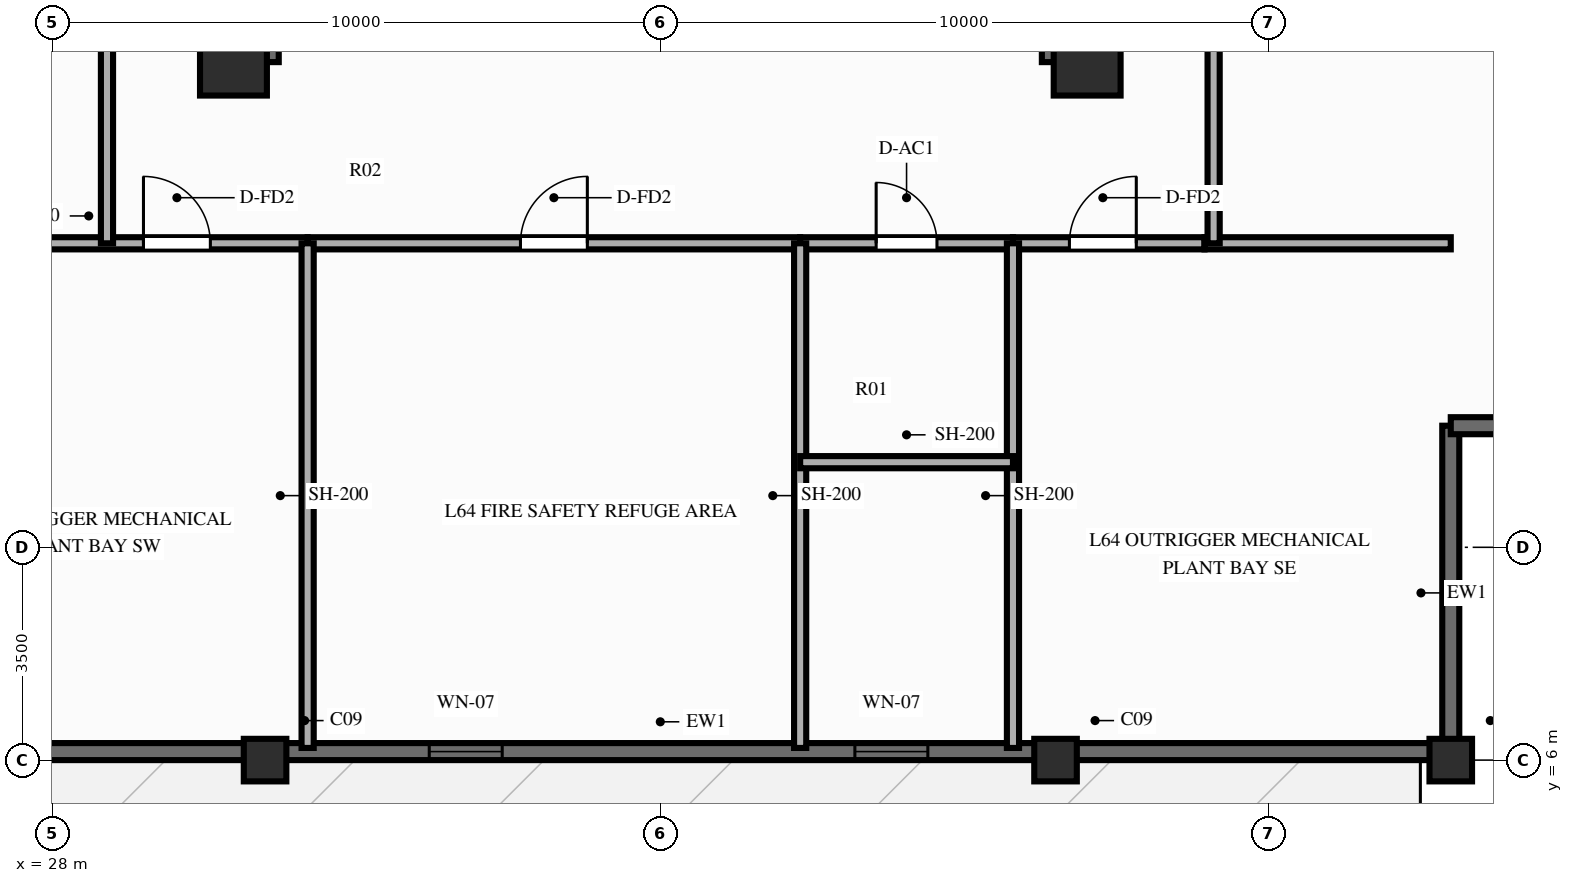
"""IFC4 building model, lengths in metres.
Left out: names, types, materials, properties, quantities, classifications, styles, units other than length and angle.
Written with IfcOpenShell. Run it as: python <this file> out.ifc"""

import sys

from ifc_helpers import new_model, si_unit, direction, frame, frame_2d, origin, origin_2d, place, context, subcontext, project, spatial, rectangle, extrude, source, transform, mapped, element, fill, save


model = new_model("IFC4")
c1 = context("Model", 3, precision=1e-05, world=origin(), true_north=direction((0.0, 1.0)))
c2 = subcontext(c1, "Body", "Model", "MODEL_VIEW")
j1 = project(units=[si_unit("LENGTHUNIT", "METRE"), si_unit("PLANEANGLEUNIT", "RADIAN")], contexts=[c1])
p1 = place(None, origin())
s1 = spatial("IfcSite", under=j1, at=p1, CompositionType="ELEMENT")
p2 = place(p1, origin())
s2 = spatial("IfcBuilding", under=s1, at=p2, CompositionType="ELEMENT")
p3 = place(p2, frame((0.0, 0.0, 206.5)))
s3 = spatial("IfcBuildingStorey", under=s2, at=p3, CompositionType="ELEMENT", Elevation=206.5)
p4 = place(p3, frame((31.5, 17.48, 0.0), z_axis=(0.0, 0.0, 1.0), x_axis=(0.0, 1.0, 0.0)))
e1 = element("IfcWall", 1, at=p4, inside=s3, PredefinedType="SHEAR", context=c2, shape_type="SweptSolid", body=[
    extrude(rectangle(XDim=19.04, YDim=0.45, at=frame_2d((9.52, 0.0))), origin(), (0.0, 0.0, 1.0), 3.8),
])
p5 = place(p4, frame((6.32, 0.0, 0.0)))
e2 = element("IfcOpeningElement", 2, at=p5, cuts=e1, PredefinedType="OPENING", context=c2, shape_type="SweptSolid", body=[
    extrude(rectangle(XDim=1.1, YDim=2.15, at=frame_2d((0.55, 1.075))), frame((0.0, 0.237, 0.0), z_axis=(0.0, -1.0, 0.0), x_axis=(1.0, 0.0, 0.0)), (0.0, 0.0, 1.0), 0.474),
])
p6 = place(p3, frame((44.5, 17.48, 0.0), z_axis=(0.0, 0.0, 1.0), x_axis=(0.0, 1.0, 0.0)))
e3 = element("IfcWall", 3, at=p6, inside=s3, PredefinedType="SHEAR", context=c2, shape_type="SweptSolid", body=[
    extrude(rectangle(XDim=19.04, YDim=0.45, at=frame_2d((9.52, 0.0))), origin(), (0.0, 0.0, 1.0), 3.8),
])
p7 = place(p6, frame((12.67, 0.0, 0.0), z_axis=(0.0, 0.0, 1.0), x_axis=(-1.0, 0.0, 0.0)))
e4 = element("IfcOpeningElement", 4, at=p7, cuts=e3, PredefinedType="OPENING", context=c2, shape_type="SweptSolid", body=[
    extrude(rectangle(XDim=1.1, YDim=2.15, at=frame_2d((0.55, 1.075))), frame((0.0, 0.237, 0.0), z_axis=(0.0, -1.0, 0.0), x_axis=(1.0, 0.0, 0.0)), (0.0, 0.0, 1.0), 0.474),
])
m1 = source(origin(), c2, "Body", "SweptSolid", [
    extrude(rectangle(XDim=1.1, YDim=1.1, at=origin_2d()), origin(), (0.0, 0.0, 1.0), 3.8),
])
for number, where, z_axis, x_axis in (
    (5, (30.98, 17.48, 0.0), (0.0, 0.0, 1.0), (1.0, 0.0, 0.0)),
    (6, (45.02, 17.48, 0.0), (0.0, 0.0, 1.0), (1.0, 0.0, 0.0)),
):
    element("IfcColumn", number, at=place(p3, frame(where, z_axis=z_axis, x_axis=x_axis)), inside=s3, PredefinedType="COLUMN", context=c2, shape_type="MappedRepresentation", body=[
        mapped(m1, transform((0.0, 0.0, 0.0), scale=1.0)),
    ])
m2 = source(origin(), c2, "Body", "SweptSolid", [
    extrude(rectangle(XDim=0.7, YDim=0.7, at=origin_2d()), origin(), (0.0, 0.0, 1.0), 3.8),
])
for number, where, z_axis, x_axis in (
    (7, (31.5, 6.0, 0.0), (0.0, 0.0, 1.0), (1.0, 0.0, 0.0)),
    (8, (44.5, 6.0, 0.0), (0.0, 0.0, 1.0), (1.0, 0.0, 0.0)),
    (9, (51.0, 6.0, 0.0), (0.0, 0.0, 1.0), (1.0, 0.0, 0.0)),
):
    element("IfcColumn", number, at=place(p3, frame(where, z_axis=z_axis, x_axis=x_axis)), inside=s3, PredefinedType="COLUMN", context=c2, shape_type="MappedRepresentation", body=[
        mapped(m2, transform((0.0, 0.0, 0.0), scale=1.0)),
    ])
p8 = place(p3, frame((25.0, 6.14, 0.0), z_axis=(0.0, 0.0, 1.0), x_axis=(1.0, 0.0, 0.0)))
e10 = element("IfcWall", 10, at=p8, inside=s3, PredefinedType="SOLIDWALL", context=c2, shape_type="SweptSolid", body=[
    extrude(rectangle(XDim=26.0, YDim=0.28, at=frame_2d((13.0, 0.0))), origin(), (0.0, 0.0, 1.0), 2.34),
])
p9 = place(p8, frame((9.2, 0.0, 0.45)))
e11 = element("IfcOpeningElement", 11, at=p9, cuts=e10, PredefinedType="OPENING", context=c2, shape_type="SweptSolid", body=[
    extrude(rectangle(XDim=1.2, YDim=0.9, at=frame_2d((0.6, 0.45))), frame((0.0, 0.152, 0.0), z_axis=(0.0, -1.0, 0.0), x_axis=(1.0, 0.0, 0.0)), (0.0, 0.0, 1.0), 0.304),
])
p10 = place(p8, frame((16.2, 0.0, 0.45)))
e12 = element("IfcOpeningElement", 12, at=p10, cuts=e10, PredefinedType="OPENING", context=c2, shape_type="SweptSolid", body=[
    extrude(rectangle(XDim=1.2, YDim=0.9, at=frame_2d((0.6, 0.45))), frame((0.0, 0.152, 0.0), z_axis=(0.0, -1.0, 0.0), x_axis=(1.0, 0.0, 0.0)), (0.0, 0.0, 1.0), 0.304),
])
for number, where, z_axis, x_axis in (
    (13, (51.0, 6.0, 0.0), (0.0, 0.0, 1.0), (0.0, 1.0, 0.0)),
    (14, (51.0, 11.5, 0.0), (0.0, 0.0, 1.0), (1.0, 0.0, 0.0)),
):
    element("IfcWall", number, at=place(p3, frame(where, z_axis=z_axis, x_axis=x_axis)), inside=s3, PredefinedType="SOLIDWALL", context=c2, shape_type="SweptSolid", body=[
        extrude(rectangle(XDim=5.5, YDim=0.28, at=frame_2d((2.75, 0.0))), origin(), (0.0, 0.0, 1.0), 2.34),
    ])
p11 = place(p3, frame((25.0, 14.5, 0.0), z_axis=(0.0, 0.0, 1.0), x_axis=(1.0, 0.0, 0.0)))
e15 = element("IfcWall", 15, at=p11, inside=s3, PredefinedType="PARTITIONING", context=c2, shape_type="SweptSolid", body=[
    extrude(rectangle(XDim=7.2, YDim=0.2, at=frame_2d((3.6, 0.0))), origin(), (0.0, 0.0, 1.0), 3.59),
])
p12 = place(p11, frame((4.5, 0.0, 0.0)))
e16 = element("IfcOpeningElement", 16, at=p12, cuts=e15, PredefinedType="OPENING", context=c2, shape_type="SweptSolid", body=[
    extrude(rectangle(XDim=1.1, YDim=2.15, at=frame_2d((0.55, 1.075))), frame((0.0, 0.112, 0.0), z_axis=(0.0, -1.0, 0.0), x_axis=(1.0, 0.0, 0.0)), (0.0, 0.0, 1.0), 0.224),
])
p13 = place(p3, frame((32.2, 14.5, 0.0), z_axis=(0.0, 0.0, 1.0), x_axis=(1.0, 0.0, 0.0)))
e17 = element("IfcWall", 17, at=p13, inside=s3, PredefinedType="PARTITIONING", context=c2, shape_type="SweptSolid", body=[
    extrude(rectangle(XDim=8.1, YDim=0.2, at=frame_2d((4.05, 0.0))), origin(), (0.0, 0.0, 1.0), 3.59),
])
p14 = place(p13, frame((3.5, 0.0, 0.0)))
e18 = element("IfcOpeningElement", 18, at=p14, cuts=e17, PredefinedType="OPENING", context=c2, shape_type="SweptSolid", body=[
    extrude(rectangle(XDim=1.1, YDim=2.15, at=frame_2d((0.55, 1.075))), frame((0.0, 0.112, 0.0), z_axis=(0.0, -1.0, 0.0), x_axis=(1.0, 0.0, 0.0)), (0.0, 0.0, 1.0), 0.224),
])
p15 = place(p3, frame((40.3, 14.5, 0.0), z_axis=(0.0, 0.0, 1.0), x_axis=(1.0, 0.0, 0.0)))
e19 = element("IfcWall", 19, at=p15, inside=s3, PredefinedType="PARTITIONING", context=c2, shape_type="SweptSolid", body=[
    extrude(rectangle(XDim=3.5, YDim=0.2, at=frame_2d((1.75, 0.0))), origin(), (0.0, 0.0, 1.0), 3.59),
])
p16 = place(p15, frame((1.25, 0.0, 0.0)))
e20 = element("IfcOpeningElement", 20, at=p16, cuts=e19, PredefinedType="OPENING", context=c2, shape_type="SweptSolid", body=[
    extrude(rectangle(XDim=1.0, YDim=2.1, at=frame_2d((0.5, 1.05))), frame((0.0, 0.112, 0.0), z_axis=(0.0, -1.0, 0.0), x_axis=(1.0, 0.0, 0.0)), (0.0, 0.0, 1.0), 0.224),
])
p17 = place(p3, frame((43.8, 14.5, 0.0), z_axis=(0.0, 0.0, 1.0), x_axis=(1.0, 0.0, 0.0)))
e21 = element("IfcWall", 21, at=p17, inside=s3, PredefinedType="PARTITIONING", context=c2, shape_type="SweptSolid", body=[
    extrude(rectangle(XDim=3.15, YDim=0.2, at=frame_2d((1.575, 0.0))), origin(), (0.0, 0.0, 1.0), 3.59),
])
p18 = place(p17, frame((0.928, 0.0, 0.0)))
e22 = element("IfcOpeningElement", 22, at=p18, cuts=e21, PredefinedType="OPENING", context=c2, shape_type="SweptSolid", body=[
    extrude(rectangle(XDim=1.1, YDim=2.15, at=frame_2d((0.55, 1.075))), frame((0.0, 0.112, 0.0), z_axis=(0.0, -1.0, 0.0), x_axis=(1.0, 0.0, 0.0)), (0.0, 0.0, 1.0), 0.224),
])
p19 = place(p3, frame((46.95, 14.5, 0.0), z_axis=(0.0, 0.0, 1.0), x_axis=(1.0, 0.0, 0.0)))
e23 = element("IfcWall", 23, at=p19, inside=s3, PredefinedType="PARTITIONING", context=c2, shape_type="SweptSolid", body=[
    extrude(rectangle(XDim=4.05, YDim=0.2, at=frame_2d((2.025, 0.0))), origin(), (0.0, 0.0, 1.0), 3.59),
])
for number, where, z_axis, x_axis in (
    (24, (32.2, 6.2, 0.0), (0.0, 0.0, 1.0), (0.0, 1.0, 0.0)),
    (25, (40.3, 6.2, 0.0), (0.0, 0.0, 1.0), (0.0, 1.0, 0.0)),
    (26, (43.8, 6.2, 0.0), (0.0, 0.0, 1.0), (0.0, 1.0, 0.0)),
):
    element("IfcWall", number, at=place(p3, frame(where, z_axis=z_axis, x_axis=x_axis)), inside=s3, PredefinedType="PARTITIONING", context=c2, shape_type="SweptSolid", body=[
        extrude(rectangle(XDim=8.3, YDim=0.2, at=frame_2d((4.15, 0.0))), origin(), (0.0, 0.0, 1.0), 3.59),
    ])
p20 = place(p3, frame((40.3, 10.9, 0.0), z_axis=(0.0, 0.0, 1.0), x_axis=(1.0, 0.0, 0.0)))
e27 = element("IfcWall", 27, at=p20, inside=s3, PredefinedType="PARTITIONING", context=c2, shape_type="SweptSolid", body=[
    extrude(rectangle(XDim=3.5, YDim=0.2, at=frame_2d((1.75, 0.0))), origin(), (0.0, 0.0, 1.0), 3.59),
])
p21 = place(p3, frame((28.9, 14.5, 0.0), z_axis=(0.0, 0.0, 1.0), x_axis=(0.0, 1.0, 0.0)))
e28 = element("IfcWall", 28, at=p21, inside=s3, PredefinedType="PARTITIONING", context=c2, shape_type="SweptSolid", body=[
    extrude(rectangle(XDim=24.8, YDim=0.2, at=frame_2d((12.4, 0.0))), origin(), (0.0, 0.0, 1.0), 3.59),
])
p22 = place(p21, frame((11.85, 0.0, 0.0)))
e29 = element("IfcOpeningElement", 29, at=p22, cuts=e28, PredefinedType="OPENING", context=c2, shape_type="SweptSolid", body=[
    extrude(rectangle(XDim=1.1, YDim=2.15, at=frame_2d((0.55, 1.075))), frame((0.0, 0.112, 0.0), z_axis=(0.0, -1.0, 0.0), x_axis=(1.0, 0.0, 0.0)), (0.0, 0.0, 1.0), 0.224),
])
p23 = place(p3, frame((47.1, 14.5, 0.0), z_axis=(0.0, 0.0, 1.0), x_axis=(0.0, 1.0, 0.0)))
e30 = element("IfcWall", 30, at=p23, inside=s3, PredefinedType="PARTITIONING", context=c2, shape_type="SweptSolid", body=[
    extrude(rectangle(XDim=24.8, YDim=0.2, at=frame_2d((12.4, 0.0))), origin(), (0.0, 0.0, 1.0), 3.59),
])
p24 = place(p23, frame((11.85, 0.0, 0.0)))
e31 = element("IfcOpeningElement", 31, at=p24, cuts=e30, PredefinedType="OPENING", context=c2, shape_type="SweptSolid", body=[
    extrude(rectangle(XDim=1.1, YDim=2.15, at=frame_2d((0.55, 1.075))), frame((0.0, 0.112, 0.0), z_axis=(0.0, -1.0, 0.0), x_axis=(1.0, 0.0, 0.0)), (0.0, 0.0, 1.0), 0.224),
])
m3 = source(origin(), c2, "Body", "SweptSolid", [
    extrude(rectangle(XDim=1.2, YDim=0.9, at=frame_2d((0.6, 0.45))), frame((0.0, 0.03, 0.0), z_axis=(0.0, -1.0, 0.0), x_axis=(1.0, 0.0, 0.0)), (0.0, 0.0, 1.0), 0.06),
])
p25 = place(p9, origin())
e32 = element("IfcWindow", 32, at=p25, inside=s3, PartitioningType="SINGLE_PANEL", PredefinedType="WINDOW", context=c2, shape_type="MappedRepresentation", body=[
    mapped(m3, transform((0.0, 0.0, 0.0), scale=1.0)),
])
fill(e11, e32)
p26 = place(p10, origin())
e33 = element("IfcWindow", 33, at=p26, inside=s3, PartitioningType="SINGLE_PANEL", PredefinedType="WINDOW", context=c2, shape_type="MappedRepresentation", body=[
    mapped(m3, transform((0.0, 0.0, 0.0), scale=1.0)),
])
fill(e12, e33)
m4 = source(origin(), c2, "Body", "SweptSolid", [
    extrude(rectangle(XDim=1.1, YDim=2.15, at=frame_2d((0.55, 1.075))), frame((0.0, 0.025, 0.0), z_axis=(0.0, -1.0, 0.0), x_axis=(1.0, 0.0, 0.0)), (0.0, 0.0, 1.0), 0.05),
])
p27 = place(p12, origin())
e34 = element("IfcDoor", 34, at=p27, inside=s3, OperationType="SINGLE_SWING_LEFT", PredefinedType="DOOR", context=c2, shape_type="MappedRepresentation", body=[
    mapped(m4, transform((0.0, 0.0, 0.0), scale=1.0)),
])
fill(e16, e34)
p28 = place(p14, origin())
e35 = element("IfcDoor", 35, at=p28, inside=s3, OperationType="SINGLE_SWING_RIGHT", PredefinedType="DOOR", context=c2, shape_type="MappedRepresentation", body=[
    mapped(m4, transform((0.0, 0.0, 0.0), scale=1.0)),
])
fill(e18, e35)
m5 = source(origin(), c2, "Body", "SweptSolid", [
    extrude(rectangle(XDim=1.0, YDim=2.1, at=frame_2d((0.5, 1.05))), frame((0.0, 0.025, 0.0), z_axis=(0.0, -1.0, 0.0), x_axis=(1.0, 0.0, 0.0)), (0.0, 0.0, 1.0), 0.05),
])
p29 = place(p16, origin())
e36 = element("IfcDoor", 36, at=p29, inside=s3, OperationType="SINGLE_SWING_LEFT", PredefinedType="DOOR", context=c2, shape_type="MappedRepresentation", body=[
    mapped(m5, transform((0.0, 0.0, 0.0), scale=1.0)),
])
fill(e20, e36)
p30 = place(p18, origin())
e37 = element("IfcDoor", 37, at=p30, inside=s3, OperationType="SINGLE_SWING_RIGHT", PredefinedType="DOOR", context=c2, shape_type="MappedRepresentation", body=[
    mapped(m4, transform((0.0, 0.0, 0.0), scale=1.0)),
])
fill(e22, e37)
save(model, sys.argv[1])
